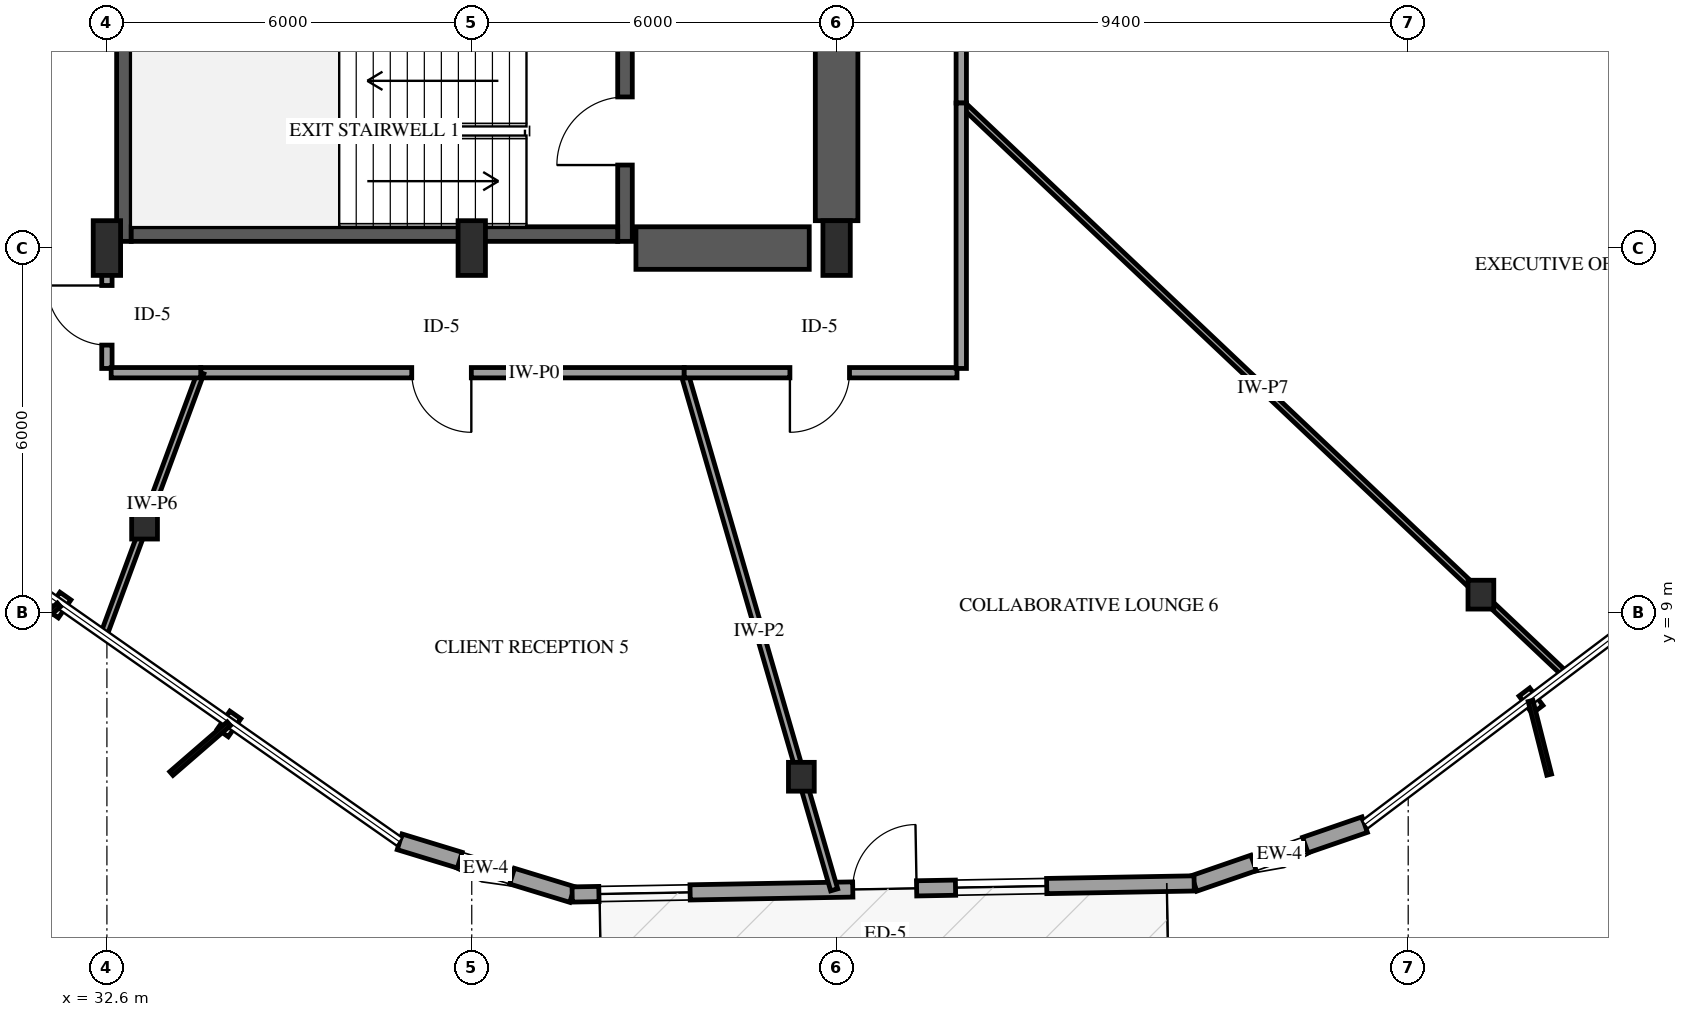
"""IFC4 building model, lengths in metres.
Left out: names, types, materials, properties, quantities, classifications, styles, units other than length and angle.
Written with IfcOpenShell. Run it as: python <this file> out.ifc"""

import sys

from ifc_helpers import new_model, si_unit, direction, frame, frame_2d, origin, origin_2d, place, context, subcontext, project, spatial, rectangle, i_section, extrude, element, fill, save


model = new_model("IFC4")
c1 = context("Model", 3, precision=1e-05, world=origin(), true_north=direction((0.0, 1.0)))
c2 = subcontext(c1, "Body", "Model", "MODEL_VIEW")
j1 = project(units=[si_unit("LENGTHUNIT", "METRE"), si_unit("PLANEANGLEUNIT", "RADIAN")], contexts=[c1])
p1 = place(None, origin())
s1 = spatial("IfcSite", under=j1, at=p1, CompositionType="ELEMENT")
p2 = place(p1, origin())
s2 = spatial("IfcBuilding", under=s1, at=p2, CompositionType="ELEMENT")
p3 = place(p2, frame((0.0, 0.0, 30.6)))
s3 = spatial("IfcBuildingStorey", under=s2, at=p3, CompositionType="ELEMENT", Elevation=30.6)
p4 = place(p3, frame((32.88, 15.11, 0.0), z_axis=(0.0, 0.0, 1.0), x_axis=(0.0, 1.0, 0.0)))
e1 = element("IfcWall", 1, at=p4, inside=s3, PredefinedType="SHEAR", context=c2, shape_type="SweptSolid", body=[
    extrude(rectangle(XDim=3.63, YDim=0.24, at=frame_2d((1.815, 0.0))), origin(), (0.0, 0.0, 1.0), 4.0),
])
p5 = place(p3, frame((41.12, 15.11, 0.0), z_axis=(0.0, 0.0, 1.0), x_axis=(0.0, 1.0, 0.0)))
e2 = element("IfcWall", 2, at=p5, inside=s3, PredefinedType="SHEAR", context=c2, shape_type="SweptSolid", body=[
    extrude(rectangle(XDim=3.63, YDim=0.24, at=frame_2d((1.815, 0.0))), origin(), (0.0, 0.0, 1.0), 4.0),
])
p6 = place(p5, frame((1.255, 0.0, 0.0)))
e3 = element("IfcOpeningElement", 3, at=p6, cuts=e2, PredefinedType="OPENING", context=c2, shape_type="SweptSolid", body=[
    extrude(rectangle(XDim=1.12, YDim=2.15, at=frame_2d((0.56, 1.075))), frame((0.0, 0.13, 0.0), z_axis=(0.0, -1.0, 0.0), x_axis=(1.0, 0.0, 0.0)), (0.0, 0.0, 1.0), 0.26),
])
p7 = place(p3, frame((33.0, 15.23, 0.0), z_axis=(0.0, 0.0, 1.0), x_axis=(1.0, 0.0, 0.0)))
e4 = element("IfcWall", 4, at=p7, inside=s3, PredefinedType="SHEAR", context=c2, shape_type="SweptSolid", body=[
    extrude(rectangle(XDim=8.0, YDim=0.24, at=frame_2d((4.0, 0.0))), origin(), (0.0, 0.0, 1.0), 4.0),
])
p8 = place(p3, frame((41.3, 15.0, 0.0), z_axis=(0.0, 0.0, 1.0), x_axis=(1.0, 0.0, 0.0)))
e5 = element("IfcWall", 5, at=p8, inside=s3, PredefinedType="SHEAR", context=c2, shape_type="SweptSolid", body=[
    extrude(rectangle(XDim=2.85, YDim=0.7, at=frame_2d((1.425, 0.0))), origin(), (0.0, 0.0, 1.0), 4.0),
])
p9 = place(p3, frame((44.6, 15.45, 0.0), z_axis=(0.0, 0.0, 1.0), x_axis=(0.0, 1.0, 0.0)))
e6 = element("IfcWall", 6, at=p9, inside=s3, PredefinedType="SHEAR", context=c2, shape_type="SweptSolid", body=[
    extrude(rectangle(XDim=6.35, YDim=0.7, at=frame_2d((3.175, 0.0))), origin(), (0.0, 0.0, 1.0), 4.0),
])
for number, where, z_axis, x_axis in (
    (7, (32.6, 15.0, -0.3), (0.0, 0.0, 1.0), (1.0, 0.0, 0.0)),
    (8, (38.6, 15.0, -0.3), (0.0, 0.0, 1.0), (1.0, 0.0, 0.0)),
    (9, (44.6, 15.0, -0.3), (0.0, 0.0, 1.0), (1.0, 0.0, 0.0)),
):
    element("IfcColumn", number, at=place(p3, frame(where, z_axis=z_axis, x_axis=x_axis)), inside=s3, PredefinedType="PILASTER", context=c2, shape_type="SweptSolid", body=[
        extrude(rectangle(XDim=0.45, YDim=0.9, at=origin_2d()), origin(), (0.0, 0.0, 1.0), 4.3),
    ])
for number, where, z_axis, x_axis in (
    (10, (33.219, 10.452, -0.3), (0.0, 0.0, 1.0), (1.0, 0.0, 0.0)),
    (11, (44.02, 6.306, -0.3), (0.0, 0.0, 1.0), (1.0, 0.0, 0.0)),
    (12, (55.196, 9.3, -0.3), (0.0, 0.0, 1.0), (1.0, 0.0, 0.0)),
):
    element("IfcColumn", number, at=place(p3, frame(where, z_axis=z_axis, x_axis=x_axis)), inside=s3, PredefinedType="COLUMN", context=c2, shape_type="SweptSolid", body=[
        extrude(i_section(OverallWidth=0.424, OverallDepth=0.474, WebThickness=0.048, FlangeThickness=0.077, FilletRadius=0.038, at=origin_2d()), origin(), (0.0, 0.0, 1.0), 4.3),
    ])
p10 = place(p3, frame((37.414, 5.236, 0.0), z_axis=(0.0, 0.0, 1.0), x_axis=(0.956417352577, -0.292003163836, 0.0)))
e13 = element("IfcWall", 13, at=p10, inside=s3, PredefinedType="SOLIDWALL", context=c2, shape_type="SweptSolid", body=[
    extrude(rectangle(XDim=2.967, YDim=0.27, at=frame_2d((1.483, 0.0))), origin(), (0.0, 0.0, 1.0), 3.079),
])
p11 = place(p10, frame((1.033, 0.0, 0.75)))
e14 = element("IfcOpeningElement", 14, at=p11, cuts=e13, PredefinedType="OPENING", context=c2, shape_type="SweptSolid", body=[
    extrude(rectangle(XDim=0.9, YDim=1.5, at=frame_2d((0.45, 0.75))), frame((0.0, 0.145, 0.0), z_axis=(0.0, -1.0, 0.0), x_axis=(1.0, 0.0, 0.0)), (0.0, 0.0, 1.0), 0.29),
])
p12 = place(p3, frame((50.48, 4.552, 0.0), z_axis=(0.0, 0.0, 1.0), x_axis=(0.945407958228, 0.325889233512, 0.0)))
e15 = element("IfcWall", 15, at=p12, inside=s3, PredefinedType="SOLIDWALL", context=c2, shape_type="SweptSolid", body=[
    extrude(rectangle(XDim=2.967, YDim=0.27, at=frame_2d((1.483, 0.0))), origin(), (0.0, 0.0, 1.0), 3.079),
])
p13 = place(p12, frame((1.033, 0.0, 0.75)))
e16 = element("IfcOpeningElement", 16, at=p13, cuts=e15, PredefinedType="OPENING", context=c2, shape_type="SweptSolid", body=[
    extrude(rectangle(XDim=0.9, YDim=1.5, at=frame_2d((0.45, 0.75))), frame((0.0, 0.145, 0.0), z_axis=(0.0, -1.0, 0.0), x_axis=(1.0, 0.0, 0.0)), (0.0, 0.0, 1.0), 0.29),
])
p14 = place(p3, frame((40.251, 4.369, 0.0), z_axis=(0.0, 0.0, 1.0), x_axis=(0.999841518507, 0.017802748951, 0.0)))
e17 = element("IfcWall", 17, at=p14, inside=s3, PredefinedType="SOLIDWALL", context=c2, shape_type="SweptSolid", body=[
    extrude(rectangle(XDim=10.23, YDim=0.25, at=frame_2d((5.115, 0.0))), origin(), (0.0, 0.0, 1.0), 3.079),
])
p15 = place(p14, frame((4.615, 0.0, 0.0)))
e18 = element("IfcOpeningElement", 18, at=p15, cuts=e17, PredefinedType="OPENING", context=c2, shape_type="SweptSolid", body=[
    extrude(rectangle(XDim=1.05, YDim=2.15, at=frame_2d((0.525, 1.075))), frame((0.0, 0.135, 0.0), z_axis=(0.0, -1.0, 0.0), x_axis=(1.0, 0.0, 0.0)), (0.0, 0.0, 1.0), 0.27),
])
p16 = place(p14, frame((0.44, 0.0, 0.72)))
e19 = element("IfcOpeningElement", 19, at=p16, cuts=e17, PredefinedType="OPENING", context=c2, shape_type="SweptSolid", body=[
    extrude(rectangle(XDim=1.5, YDim=1.7, at=frame_2d((0.75, 0.85))), frame((0.0, 0.135, 0.0), z_axis=(0.0, -1.0, 0.0), x_axis=(1.0, 0.0, 0.0)), (0.0, 0.0, 1.0), 0.27),
])
p17 = place(p14, frame((6.305, 0.0, 0.72)))
e20 = element("IfcOpeningElement", 20, at=p17, cuts=e17, PredefinedType="OPENING", context=c2, shape_type="SweptSolid", body=[
    extrude(rectangle(XDim=1.5, YDim=1.7, at=frame_2d((0.75, 0.85))), frame((0.0, 0.135, 0.0), z_axis=(0.0, -1.0, 0.0), x_axis=(1.0, 0.0, 0.0)), (0.0, 0.0, 1.0), 0.27),
])
p18 = place(p3, frame((46.65, 22.738, 0.0), z_axis=(0.0, 0.0, 1.0), x_axis=(0.962724324988, -0.270484517259, 0.0)))
e21 = element("IfcWall", 21, at=p18, inside=s3, PredefinedType="PARTITIONING", context=c2, shape_type="SweptSolid", body=[
    extrude(rectangle(XDim=18.308, YDim=0.11, at=frame_2d((9.154, 0.0))), origin(), (0.0, 0.0, 1.0), 2.995),
])
p19 = place(p3, frame((46.65, 17.385, 0.0), z_axis=(0.0, 0.0, 1.0), x_axis=(0.726425487131, -0.687245233993, 0.0)))
e22 = element("IfcWall", 22, at=p19, inside=s3, PredefinedType="PARTITIONING", context=c2, shape_type="SweptSolid", body=[
    extrude(rectangle(XDim=13.659, YDim=0.1, at=frame_2d((6.83, 0.0))), origin(), (0.0, 0.0, 1.0), 2.995),
])
p20 = place(p3, frame((42.094, 12.95, 0.0), z_axis=(0.0, 0.0, 1.0), x_axis=(0.278517328655, -0.960431204011, 0.0)))
e23 = element("IfcWall", 23, at=p20, inside=s3, PredefinedType="PARTITIONING", context=c2, shape_type="SweptSolid", body=[
    extrude(rectangle(XDim=8.854, YDim=0.12, at=frame_2d((4.427, 0.0))), origin(), (0.0, 0.0, 1.0), 2.995),
])
p21 = place(p3, frame((42.094, 12.95, 0.0), z_axis=(0.0, 0.0, 1.0), x_axis=(-1.0, 0.0, 0.0)))
e24 = element("IfcWall", 24, at=p21, inside=s3, PredefinedType="PARTITIONING", context=c2, shape_type="SweptSolid", body=[
    extrude(rectangle(XDim=7.951, YDim=0.17, at=frame_2d((3.976, 0.0))), origin(), (0.0, 0.0, 1.0), 3.7),
])
p22 = place(p21, frame((3.501, 0.0, 0.0)))
e25 = element("IfcOpeningElement", 25, at=p22, cuts=e24, PredefinedType="OPENING", context=c2, shape_type="SweptSolid", body=[
    extrude(rectangle(XDim=0.98, YDim=2.15, at=frame_2d((0.49, 1.075))), frame((0.0, 0.095, 0.0), z_axis=(0.0, -1.0, 0.0), x_axis=(1.0, 0.0, 0.0)), (0.0, 0.0, 1.0), 0.19),
])
p23 = place(p3, frame((46.65, 22.738, 0.0), z_axis=(0.0, 0.0, 1.0), x_axis=(0.0, -1.0, 0.0)))
e26 = element("IfcWall", 26, at=p23, inside=s3, PredefinedType="PARTITIONING", context=c2, shape_type="SweptSolid", body=[
    extrude(rectangle(XDim=5.353, YDim=0.17, at=frame_2d((2.677, 0.0))), origin(), (0.0, 0.0, 1.0), 3.7),
])
p24 = place(p23, frame((2.201, 0.0, 0.0)))
e27 = element("IfcOpeningElement", 27, at=p24, cuts=e26, PredefinedType="OPENING", context=c2, shape_type="SweptSolid", body=[
    extrude(rectangle(XDim=0.98, YDim=2.15, at=frame_2d((0.49, 1.075))), frame((0.0, 0.095, 0.0), z_axis=(0.0, -1.0, 0.0), x_axis=(1.0, 0.0, 0.0)), (0.0, 0.0, 1.0), 0.19),
])
p25 = place(p3, frame((34.143, 12.95, 0.0), z_axis=(0.0, 0.0, 1.0), x_axis=(-0.3470565426, -0.937844206805, 0.0)))
e28 = element("IfcWall", 28, at=p25, inside=s3, PredefinedType="PARTITIONING", context=c2, shape_type="SweptSolid", body=[
    extrude(rectangle(XDim=4.596, YDim=0.11, at=frame_2d((2.298, 0.0))), origin(), (0.0, 0.0, 1.0), 2.995),
])
p26 = place(p3, frame((46.58, 12.95, 0.0), z_axis=(0.0, 0.0, 1.0), x_axis=(-1.0, 0.0, 0.0)))
e29 = element("IfcWall", 29, at=p26, inside=s3, PredefinedType="PARTITIONING", context=c2, shape_type="SweptSolid", body=[
    extrude(rectangle(XDim=4.486, YDim=0.17, at=frame_2d((2.243, 0.0))), origin(), (0.0, 0.0, 1.0), 3.7),
])
p27 = place(p26, frame((1.768, 0.0, 0.0)))
e30 = element("IfcOpeningElement", 30, at=p27, cuts=e29, PredefinedType="OPENING", context=c2, shape_type="SweptSolid", body=[
    extrude(rectangle(XDim=0.98, YDim=2.15, at=frame_2d((0.49, 1.075))), frame((0.0, 0.095, 0.0), z_axis=(0.0, -1.0, 0.0), x_axis=(1.0, 0.0, 0.0)), (0.0, 0.0, 1.0), 0.19),
])
p28 = place(p3, frame((46.65, 17.385, 0.0), z_axis=(0.0, 0.0, 1.0), x_axis=(0.0, -1.0, 0.0)))
e31 = element("IfcWall", 31, at=p28, inside=s3, PredefinedType="PARTITIONING", context=c2, shape_type="SweptSolid", body=[
    extrude(rectangle(XDim=4.365, YDim=0.17, at=frame_2d((2.183, 0.0))), origin(), (0.0, 0.0, 1.0), 3.7),
])
p29 = place(p3, frame((32.6, 13.02, 0.0), z_axis=(0.0, 0.0, 1.0), x_axis=(0.0, 1.0, 0.0)))
e32 = element("IfcWall", 32, at=p29, inside=s3, PredefinedType="PARTITIONING", context=c2, shape_type="SweptSolid", body=[
    extrude(rectangle(XDim=1.91, YDim=0.17, at=frame_2d((0.955, 0.0))), origin(), (0.0, 0.0, 1.0), 3.7),
])
p30 = place(p29, frame((0.384, 0.0, 0.0)))
e33 = element("IfcOpeningElement", 33, at=p30, cuts=e32, PredefinedType="OPENING", context=c2, shape_type="SweptSolid", body=[
    extrude(rectangle(XDim=0.98, YDim=2.15, at=frame_2d((0.49, 1.075))), frame((0.0, 0.095, 0.0), z_axis=(0.0, -1.0, 0.0), x_axis=(1.0, 0.0, 0.0)), (0.0, 0.0, 1.0), 0.19),
])
p31 = place(p3, frame((34.143, 12.95, 0.0), z_axis=(0.0, 0.0, 1.0), x_axis=(-1.0, 0.0, 0.0)))
e34 = element("IfcWall", 34, at=p31, inside=s3, PredefinedType="PARTITIONING", context=c2, shape_type="SweptSolid", body=[
    extrude(rectangle(XDim=1.473, YDim=0.17, at=frame_2d((0.737, 0.0))), origin(), (0.0, 0.0, 1.0), 3.7),
])
p32 = place(p11, origin())
e35 = element("IfcWindow", 35, at=p32, inside=s3, PartitioningType="SINGLE_PANEL", PredefinedType="WINDOW", context=c2, shape_type="SweptSolid", body=[
    extrude(rectangle(XDim=0.9, YDim=1.5, at=frame_2d((0.45, 0.75))), frame((0.0, 0.03, 0.0), z_axis=(0.0, -1.0, 0.0), x_axis=(1.0, 0.0, 0.0)), (0.0, 0.0, 1.0), 0.06),
])
fill(e14, e35)
p33 = place(p13, origin())
e36 = element("IfcWindow", 36, at=p33, inside=s3, PartitioningType="SINGLE_PANEL", PredefinedType="WINDOW", context=c2, shape_type="SweptSolid", body=[
    extrude(rectangle(XDim=0.9, YDim=1.5, at=frame_2d((0.45, 0.75))), frame((0.0, 0.03, 0.0), z_axis=(0.0, -1.0, 0.0), x_axis=(1.0, 0.0, 0.0)), (0.0, 0.0, 1.0), 0.06),
])
fill(e16, e36)
p34 = place(p15, origin())
e37 = element("IfcDoor", 37, at=p34, inside=s3, OperationType="SINGLE_SWING_RIGHT", PredefinedType="DOOR", context=c2, shape_type="SweptSolid", body=[
    extrude(rectangle(XDim=1.05, YDim=2.15, at=frame_2d((0.525, 1.075))), frame((0.0, 0.025, 0.0), z_axis=(0.0, -1.0, 0.0), x_axis=(1.0, 0.0, 0.0)), (0.0, 0.0, 1.0), 0.05),
])
fill(e18, e37)
p35 = place(p16, origin())
e38 = element("IfcWindow", 38, at=p35, inside=s3, PartitioningType="SINGLE_PANEL", PredefinedType="WINDOW", context=c2, shape_type="SweptSolid", body=[
    extrude(rectangle(XDim=1.5, YDim=1.7, at=frame_2d((0.75, 0.85))), frame((0.0, 0.03, 0.0), z_axis=(0.0, -1.0, 0.0), x_axis=(1.0, 0.0, 0.0)), (0.0, 0.0, 1.0), 0.06),
])
fill(e19, e38)
p36 = place(p17, origin())
e39 = element("IfcWindow", 39, at=p36, inside=s3, PartitioningType="SINGLE_PANEL", PredefinedType="WINDOW", context=c2, shape_type="SweptSolid", body=[
    extrude(rectangle(XDim=1.5, YDim=1.7, at=frame_2d((0.75, 0.85))), frame((0.0, 0.03, 0.0), z_axis=(0.0, -1.0, 0.0), x_axis=(1.0, 0.0, 0.0)), (0.0, 0.0, 1.0), 0.06),
])
fill(e20, e39)
p37 = place(p6, origin())
e40 = element("IfcDoor", 40, at=p37, inside=s3, OperationType="SINGLE_SWING_LEFT", PredefinedType="DOOR", context=c2, shape_type="SweptSolid", body=[
    extrude(rectangle(XDim=1.12, YDim=2.15, at=frame_2d((0.56, 1.075))), frame((0.0, 0.025, 0.0), z_axis=(0.0, -1.0, 0.0), x_axis=(1.0, 0.0, 0.0)), (0.0, 0.0, 1.0), 0.05),
])
fill(e3, e40)
p38 = place(p22, origin())
e41 = element("IfcDoor", 41, at=p38, inside=s3, OperationType="SINGLE_SWING_LEFT", PredefinedType="DOOR", context=c2, shape_type="SweptSolid", body=[
    extrude(rectangle(XDim=0.98, YDim=2.15, at=frame_2d((0.49, 1.075))), frame((0.0, 0.025, 0.0), z_axis=(0.0, -1.0, 0.0), x_axis=(1.0, 0.0, 0.0)), (0.0, 0.0, 1.0), 0.05),
])
fill(e25, e41)
p39 = place(p27, origin())
e42 = element("IfcDoor", 42, at=p39, inside=s3, OperationType="SINGLE_SWING_RIGHT", PredefinedType="DOOR", context=c2, shape_type="SweptSolid", body=[
    extrude(rectangle(XDim=0.98, YDim=2.15, at=frame_2d((0.49, 1.075))), frame((0.0, 0.025, 0.0), z_axis=(0.0, -1.0, 0.0), x_axis=(1.0, 0.0, 0.0)), (0.0, 0.0, 1.0), 0.05),
])
fill(e30, e42)
p40 = place(p30, origin())
e43 = element("IfcDoor", 43, at=p40, inside=s3, OperationType="SINGLE_SWING_RIGHT", PredefinedType="DOOR", context=c2, shape_type="SweptSolid", body=[
    extrude(rectangle(XDim=0.98, YDim=2.15, at=frame_2d((0.49, 1.075))), frame((0.0, 0.025, 0.0), z_axis=(0.0, -1.0, 0.0), x_axis=(1.0, 0.0, 0.0)), (0.0, 0.0, 1.0), 0.05),
])
fill(e33, e43)
save(model, sys.argv[1])
